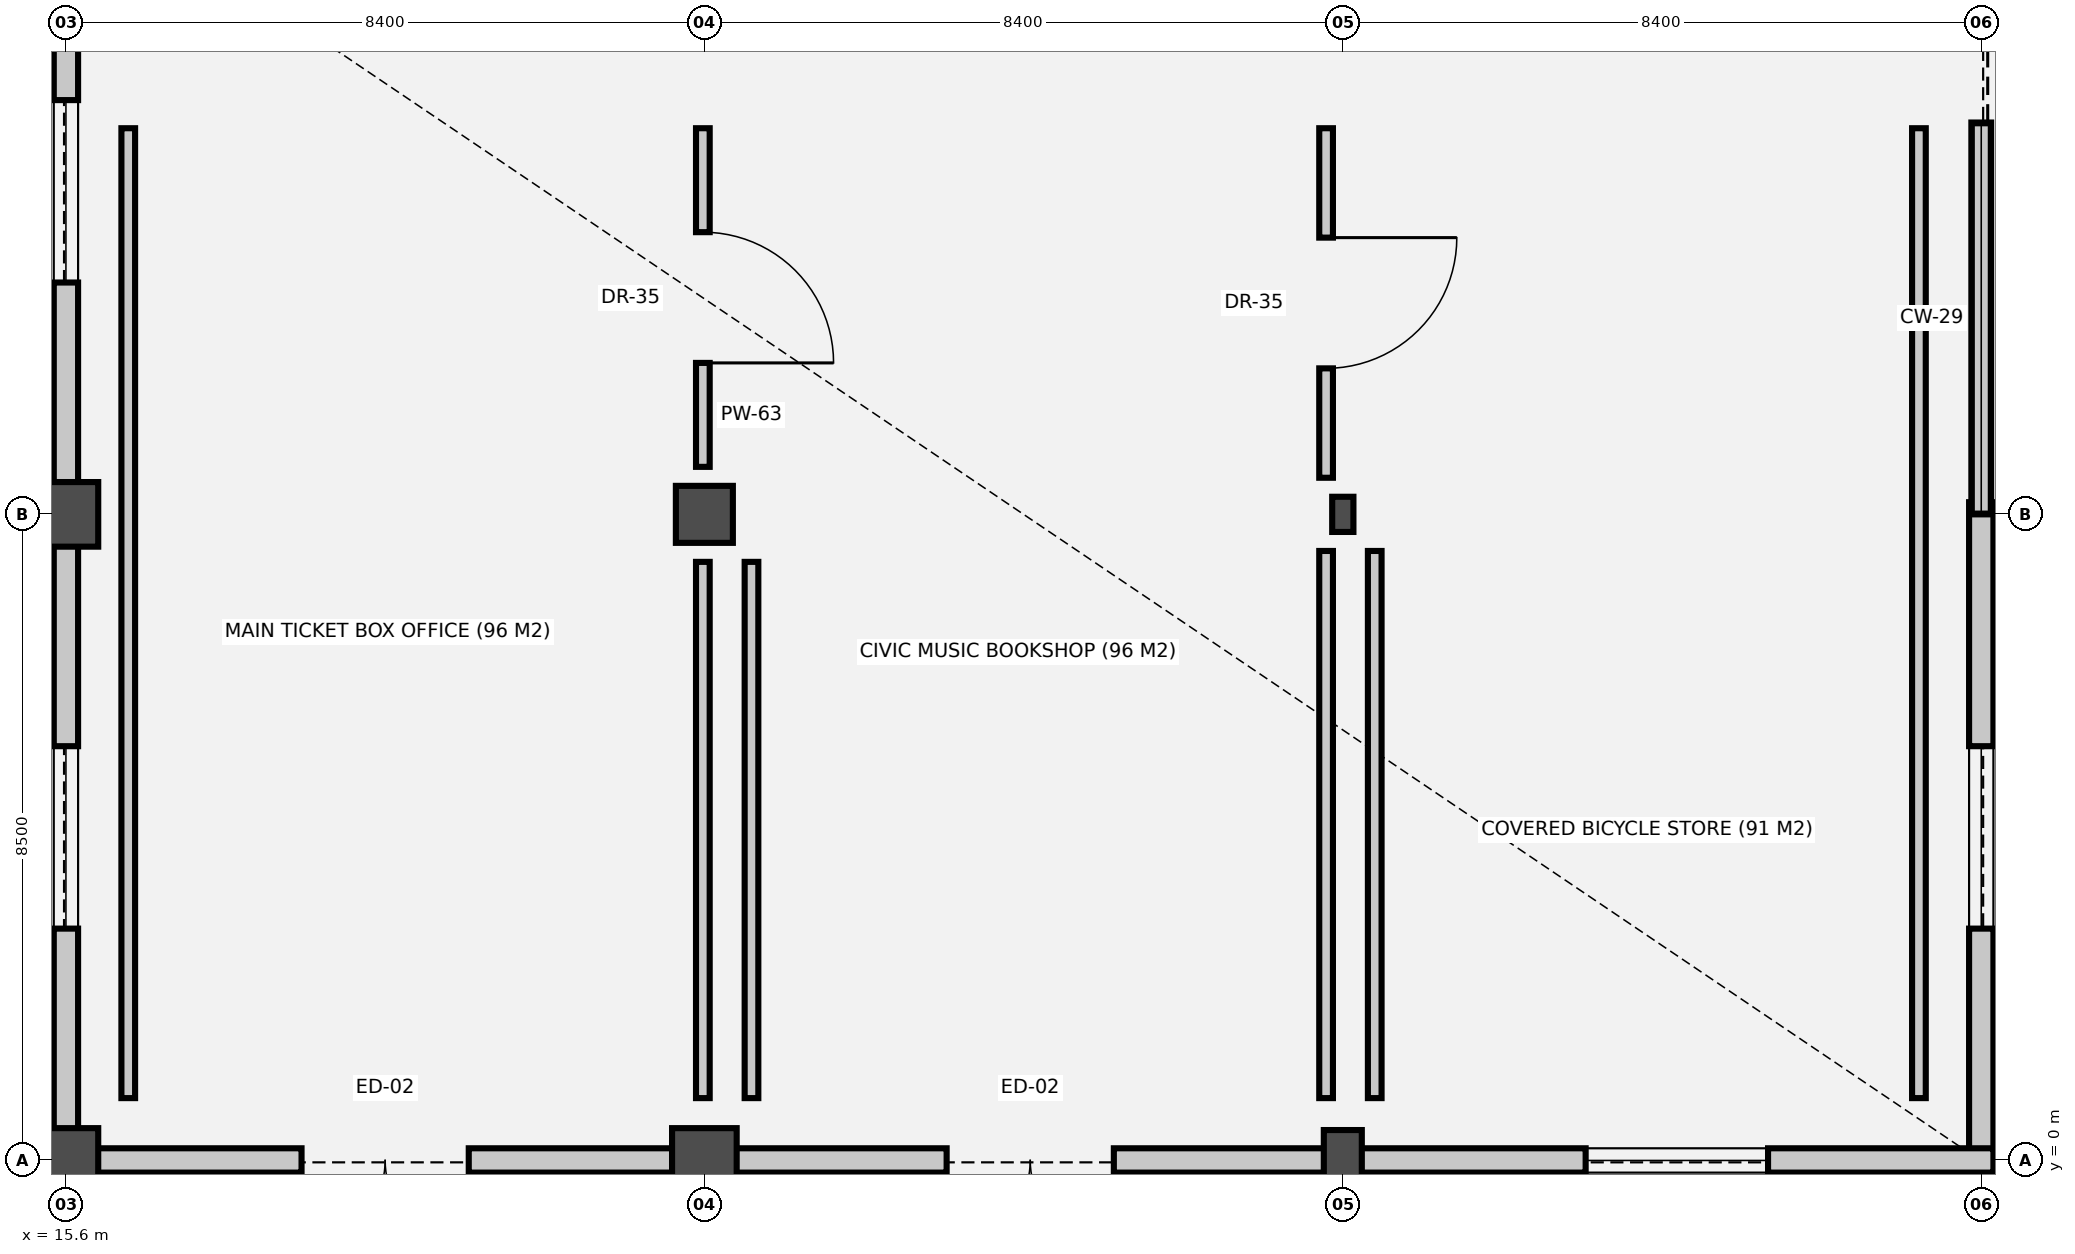
"""IFC4 building model, lengths in metres.
Left out: names, types, materials, properties, quantities, classifications, styles, units other than length and angle.
Written with IfcOpenShell. Run it as: python <this file> out.ifc"""

import sys

from ifc_helpers import new_model, si_unit, direction, frame, frame_2d, origin, origin_2d, place, context, subcontext, project, spatial, rectangle, circle, i_section, extrude, element, fill, save


model = new_model("IFC4")
c1 = context("Model", 3, precision=1e-05, world=origin(), true_north=direction((0.0, 1.0)))
c2 = subcontext(c1, "Body", "Model", "MODEL_VIEW")
j1 = project(units=[si_unit("LENGTHUNIT", "METRE"), si_unit("PLANEANGLEUNIT", "RADIAN")], contexts=[c1])
p1 = place(None, origin())
s1 = spatial("IfcSite", under=j1, at=p1, CompositionType="ELEMENT")
p2 = place(p1, origin())
s2 = spatial("IfcBuilding", under=s1, at=p2, CompositionType="ELEMENT")
p3 = place(p2, origin())
s3 = spatial("IfcBuildingStorey", under=s2, at=p3, CompositionType="ELEMENT", Elevation=0.0)
for number, where, z_axis, x_axis in (
    (1, (15.6, 0.0, 0.0), (0.0, 0.0, 1.0), (1.0, 0.0, 0.0)),
    (2, (15.6, 8.5, 0.0), (0.0, 0.0, 1.0), (1.0, 0.0, 0.0)),
    (3, (24.0, 0.0, 0.0), (0.0, 0.0, 1.0), (1.0, 0.0, 0.0)),
):
    element("IfcColumn", number, at=place(p3, frame(where, z_axis=z_axis, x_axis=x_axis)), inside=s3, PredefinedType="COLUMN", context=c2, shape_type="SweptSolid", body=[
        extrude(circle(Radius=0.425, at=origin_2d()), origin(), (0.0, 0.0, 1.0), 5.4),
    ])
p4 = place(p3, frame((24.0, 8.5, 0.0), z_axis=(0.0, 0.0, 1.0), x_axis=(1.0, 0.0, 0.0)))
e4 = element("IfcColumn", 4, at=p4, inside=s3, PredefinedType="COLUMN", context=c2, shape_type="SweptSolid", body=[
    extrude(rectangle(XDim=0.75, YDim=0.75, at=origin_2d()), origin(), (0.0, 0.0, 1.0), 5.4),
])
p5 = place(p3, frame((32.4, 0.0, 0.0), z_axis=(0.0, 0.0, 1.0), x_axis=(1.0, 0.0, 0.0)))
e5 = element("IfcColumn", 5, at=p5, inside=s3, PredefinedType="PILASTER", context=c2, shape_type="SweptSolid", body=[
    extrude(rectangle(XDim=0.5, YDim=0.8, at=origin_2d()), origin(), (0.0, 0.0, 1.0), 5.4),
])
p6 = place(p3, frame((32.4, 8.5, 0.0), z_axis=(0.0, 0.0, 1.0), x_axis=(1.0, 0.0, 0.0)))
e6 = element("IfcColumn", 6, at=p6, inside=s3, PredefinedType="PILASTER", context=c2, shape_type="SweptSolid", body=[
    extrude(i_section(OverallWidth=0.28, OverallDepth=0.463, WebThickness=0.011, FlangeThickness=0.017, at=origin_2d()), origin(), (0.0, 0.0, 1.0), 5.4),
])
p7 = place(p3, frame((15.6, 0.405, 0.0), z_axis=(0.0, 0.0, 1.0), x_axis=(0.0, 1.0, 0.0)))
e7 = element("IfcWall", 7, at=p7, inside=s3, PredefinedType="SOLIDWALL", context=c2, shape_type="SweptSolid", body=[
    extrude(rectangle(XDim=7.69, YDim=0.32, at=frame_2d((3.845, 0.0))), origin(), (0.0, 0.0, 1.0), 4.516),
])
p8 = place(p7, frame((2.645, 0.0, 0.9)))
e8 = element("IfcOpeningElement", 8, at=p8, cuts=e7, PredefinedType="OPENING", context=c2, shape_type="SweptSolid", body=[
    extrude(rectangle(XDim=2.4, YDim=2.3, at=frame_2d((1.2, 1.15))), frame((0.0, 0.17, 0.0), z_axis=(0.0, -1.0, 0.0), x_axis=(1.0, 0.0, 0.0)), (0.0, 0.0, 1.0), 0.34),
])
p9 = place(p3, frame((15.6, 8.905, 0.0), z_axis=(0.0, 0.0, 1.0), x_axis=(0.0, 1.0, 0.0)))
e9 = element("IfcWall", 9, at=p9, inside=s3, PredefinedType="SOLIDWALL", context=c2, shape_type="SweptSolid", body=[
    extrude(rectangle(XDim=7.69, YDim=0.32, at=frame_2d((3.845, 0.0))), origin(), (0.0, 0.0, 1.0), 4.575),
])
p10 = place(p9, frame((2.645, 0.0, 0.9)))
e10 = element("IfcOpeningElement", 10, at=p10, cuts=e9, PredefinedType="OPENING", context=c2, shape_type="SweptSolid", body=[
    extrude(rectangle(XDim=2.4, YDim=2.3, at=frame_2d((1.2, 1.15))), frame((0.0, 0.17, 0.0), z_axis=(0.0, -1.0, 0.0), x_axis=(1.0, 0.0, 0.0)), (0.0, 0.0, 1.0), 0.34),
])
p11 = place(p3, frame((40.8, 8.66, 0.0), z_axis=(0.0, 0.0, 1.0), x_axis=(0.0, -1.0, 0.0)))
e11 = element("IfcWall", 11, at=p11, inside=s3, PredefinedType="SOLIDWALL", context=c2, shape_type="SweptSolid", body=[
    extrude(rectangle(XDim=8.82, YDim=0.32, at=frame_2d((4.41, 0.0))), origin(), (0.0, 0.0, 1.0), 5.12),
])
p12 = place(p11, frame((3.21, 0.0, 0.9)))
e12 = element("IfcOpeningElement", 12, at=p12, cuts=e11, PredefinedType="OPENING", context=c2, shape_type="SweptSolid", body=[
    extrude(rectangle(XDim=2.4, YDim=2.3, at=frame_2d((1.2, 1.15))), frame((0.0, 0.17, 0.0), z_axis=(0.0, -1.0, 0.0), x_axis=(1.0, 0.0, 0.0)), (0.0, 0.0, 1.0), 0.34),
])
p13 = place(p3, frame((40.8, 13.655, 0.0), z_axis=(0.0, 0.0, 1.0), x_axis=(0.0, -1.0, 0.0)))
e13 = element("IfcWall", 13, at=p13, inside=s3, PredefinedType="PARAPET", context=c2, shape_type="SweptSolid", body=[
    extrude(rectangle(XDim=5.155, YDim=0.26, at=frame_2d((2.578, 0.0))), origin(), (0.0, 0.0, 1.0), 1.12),
])
p14 = place(p3, frame((23.595, 0.0, 0.0), z_axis=(0.0, 0.0, 1.0), x_axis=(-1.0, 0.0, 0.0)))
e14 = element("IfcWall", 14, at=p14, inside=s3, PredefinedType="SOLIDWALL", context=c2, shape_type="SweptSolid", body=[
    extrude(rectangle(XDim=7.59, YDim=0.32, at=frame_2d((3.795, 0.0))), origin(), (0.0, 0.0, 1.0), 4.197),
])
p15 = place(p14, frame((2.695, 0.0, 0.0)))
e15 = element("IfcOpeningElement", 15, at=p15, cuts=e14, PredefinedType="OPENING", context=c2, shape_type="SweptSolid", body=[
    extrude(rectangle(XDim=2.2, YDim=2.4, at=frame_2d((1.1, 1.2))), frame((0.0, 0.17, 0.0), z_axis=(0.0, -1.0, 0.0), x_axis=(1.0, 0.0, 0.0)), (0.0, 0.0, 1.0), 0.34),
])
p16 = place(p3, frame((32.17, 0.0, 0.0), z_axis=(0.0, 0.0, 1.0), x_axis=(-1.0, 0.0, 0.0)))
e16 = element("IfcWall", 16, at=p16, inside=s3, PredefinedType="SOLIDWALL", context=c2, shape_type="SweptSolid", body=[
    extrude(rectangle(XDim=7.765, YDim=0.32, at=frame_2d((3.882, 0.0))), origin(), (0.0, 0.0, 1.0), 4.078),
])
p17 = place(p16, frame((2.782, 0.0, 0.0)))
e17 = element("IfcOpeningElement", 17, at=p17, cuts=e16, PredefinedType="OPENING", context=c2, shape_type="SweptSolid", body=[
    extrude(rectangle(XDim=2.2, YDim=2.4, at=frame_2d((1.1, 1.2))), frame((0.0, 0.17, 0.0), z_axis=(0.0, -1.0, 0.0), x_axis=(1.0, 0.0, 0.0)), (0.0, 0.0, 1.0), 0.34),
])
p18 = place(p3, frame((40.96, 0.0, 0.0), z_axis=(0.0, 0.0, 1.0), x_axis=(-1.0, 0.0, 0.0)))
e18 = element("IfcWall", 18, at=p18, inside=s3, PredefinedType="SOLIDWALL", context=c2, shape_type="SweptSolid", body=[
    extrude(rectangle(XDim=8.33, YDim=0.32, at=frame_2d((4.165, 0.0))), origin(), (0.0, 0.0, 1.0), 5.12),
])
p19 = place(p18, frame((2.965, 0.0, 0.9)))
e19 = element("IfcOpeningElement", 19, at=p19, cuts=e18, PredefinedType="OPENING", context=c2, shape_type="SweptSolid", body=[
    extrude(rectangle(XDim=2.4, YDim=2.3, at=frame_2d((1.2, 1.15))), frame((0.0, 0.17, 0.0), z_axis=(0.0, -1.0, 0.0), x_axis=(1.0, 0.0, 0.0)), (0.0, 0.0, 1.0), 0.34),
])
p20 = place(p3, frame((23.98, 13.58, 0.0), z_axis=(0.0, 0.0, 1.0), x_axis=(0.0, -1.0, 0.0)))
e20 = element("IfcWall", 20, at=p20, inside=s3, PredefinedType="PARTITIONING", context=c2, shape_type="SweptSolid", body=[
    extrude(rectangle(XDim=4.455, YDim=0.18, at=frame_2d((2.228, 0.0))), origin(), (0.0, 0.0, 1.0), 4.04),
])
p21 = place(p20, frame((1.367, 0.0, 0.0)))
e21 = element("IfcOpeningElement", 21, at=p21, cuts=e20, PredefinedType="OPENING", context=c2, shape_type="SweptSolid", body=[
    extrude(rectangle(XDim=1.72, YDim=2.36, at=frame_2d((0.86, 1.18))), frame((0.0, 0.1, 0.0), z_axis=(0.0, -1.0, 0.0), x_axis=(1.0, 0.0, 0.0)), (0.0, 0.0, 1.0), 0.2),
])
p22 = place(p3, frame((23.98, 7.875, 0.0), z_axis=(0.0, 0.0, 1.0), x_axis=(0.0, -1.0, 0.0)))
e22 = element("IfcWall", 22, at=p22, inside=s3, PredefinedType="PARTITIONING", context=c2, shape_type="SweptSolid", body=[
    extrude(rectangle(XDim=7.055, YDim=0.18, at=frame_2d((3.527, 0.0))), origin(), (0.0, 0.0, 1.0), 4.04),
])
p23 = place(p3, frame((16.42, 0.82, 0.0), z_axis=(0.0, 0.0, 1.0), x_axis=(0.0, 1.0, 0.0)))
e23 = element("IfcWall", 23, at=p23, inside=s3, PredefinedType="PARTITIONING", context=c2, shape_type="SweptSolid", body=[
    extrude(rectangle(XDim=12.76, YDim=0.18, at=frame_2d((6.38, 0.0))), origin(), (0.0, 0.0, 1.0), 4.04),
])
p24 = place(p3, frame((32.18, 13.58, 0.0), z_axis=(0.0, 0.0, 1.0), x_axis=(0.0, -1.0, 0.0)))
e24 = element("IfcWall", 24, at=p24, inside=s3, PredefinedType="PARTITIONING", context=c2, shape_type="SweptSolid", body=[
    extrude(rectangle(XDim=4.599, YDim=0.18, at=frame_2d((2.299, 0.0))), origin(), (0.0, 0.0, 1.0), 4.04),
])
p25 = place(p24, frame((1.439, 0.0, 0.0)))
e25 = element("IfcOpeningElement", 25, at=p25, cuts=e24, PredefinedType="OPENING", context=c2, shape_type="SweptSolid", body=[
    extrude(rectangle(XDim=1.72, YDim=2.36, at=frame_2d((0.86, 1.18))), frame((0.0, 0.1, 0.0), z_axis=(0.0, -1.0, 0.0), x_axis=(1.0, 0.0, 0.0)), (0.0, 0.0, 1.0), 0.2),
])
p26 = place(p3, frame((32.18, 8.019, 0.0), z_axis=(0.0, 0.0, 1.0), x_axis=(0.0, -1.0, 0.0)))
e26 = element("IfcWall", 26, at=p26, inside=s3, PredefinedType="PARTITIONING", context=c2, shape_type="SweptSolid", body=[
    extrude(rectangle(XDim=7.198, YDim=0.18, at=frame_2d((3.599, 0.0))), origin(), (0.0, 0.0, 1.0), 4.04),
])
p27 = place(p3, frame((24.62, 0.82, 0.0), z_axis=(0.0, 0.0, 1.0), x_axis=(0.0, 1.0, 0.0)))
e27 = element("IfcWall", 27, at=p27, inside=s3, PredefinedType="PARTITIONING", context=c2, shape_type="SweptSolid", body=[
    extrude(rectangle(XDim=7.055, YDim=0.18, at=frame_2d((3.527, 0.0))), origin(), (0.0, 0.0, 1.0), 4.04),
])
p28 = place(p3, frame((39.98, 13.58, 0.0), z_axis=(0.0, 0.0, 1.0), x_axis=(0.0, -1.0, 0.0)))
e28 = element("IfcWall", 28, at=p28, inside=s3, PredefinedType="PARTITIONING", context=c2, shape_type="SweptSolid", body=[
    extrude(rectangle(XDim=12.76, YDim=0.18, at=frame_2d((6.38, 0.0))), origin(), (0.0, 0.0, 1.0), 4.04),
])
p29 = place(p3, frame((32.82, 0.82, 0.0), z_axis=(0.0, 0.0, 1.0), x_axis=(0.0, 1.0, 0.0)))
e29 = element("IfcWall", 29, at=p29, inside=s3, PredefinedType="PARTITIONING", context=c2, shape_type="SweptSolid", body=[
    extrude(rectangle(XDim=7.198, YDim=0.18, at=frame_2d((3.599, 0.0))), origin(), (0.0, 0.0, 1.0), 4.04),
])
p30 = place(p8, origin())
e30 = element("IfcWindow", 30, at=p30, inside=s3, PartitioningType="SINGLE_PANEL", PredefinedType="WINDOW", context=c2, shape_type="SweptSolid", body=[
    extrude(rectangle(XDim=2.4, YDim=2.3, at=frame_2d((1.2, 1.15))), frame((0.0, 0.03, 0.0), z_axis=(0.0, -1.0, 0.0), x_axis=(1.0, 0.0, 0.0)), (0.0, 0.0, 1.0), 0.06),
])
fill(e8, e30)
p31 = place(p10, origin())
e31 = element("IfcWindow", 31, at=p31, inside=s3, PartitioningType="SINGLE_PANEL", PredefinedType="WINDOW", context=c2, shape_type="SweptSolid", body=[
    extrude(rectangle(XDim=2.4, YDim=2.3, at=frame_2d((1.2, 1.15))), frame((0.0, 0.03, 0.0), z_axis=(0.0, -1.0, 0.0), x_axis=(1.0, 0.0, 0.0)), (0.0, 0.0, 1.0), 0.06),
])
fill(e10, e31)
p32 = place(p12, origin())
e32 = element("IfcWindow", 32, at=p32, inside=s3, PartitioningType="SINGLE_PANEL", PredefinedType="WINDOW", context=c2, shape_type="SweptSolid", body=[
    extrude(rectangle(XDim=2.4, YDim=2.3, at=frame_2d((1.2, 1.15))), frame((0.0, 0.03, 0.0), z_axis=(0.0, -1.0, 0.0), x_axis=(1.0, 0.0, 0.0)), (0.0, 0.0, 1.0), 0.06),
])
fill(e12, e32)
p33 = place(p15, origin())
e33 = element("IfcDoor", 33, at=p33, inside=s3, OperationType="DOUBLE_DOOR_SINGLE_SWING", PredefinedType="DOOR", context=c2, shape_type="SweptSolid", body=[
    extrude(rectangle(XDim=2.2, YDim=2.4, at=frame_2d((1.1, 1.2))), frame((0.0, 0.025, 0.0), z_axis=(0.0, -1.0, 0.0), x_axis=(1.0, 0.0, 0.0)), (0.0, 0.0, 1.0), 0.05),
])
fill(e15, e33)
p34 = place(p17, origin())
e34 = element("IfcDoor", 34, at=p34, inside=s3, OperationType="DOUBLE_DOOR_SINGLE_SWING", PredefinedType="DOOR", context=c2, shape_type="SweptSolid", body=[
    extrude(rectangle(XDim=2.2, YDim=2.4, at=frame_2d((1.1, 1.2))), frame((0.0, 0.025, 0.0), z_axis=(0.0, -1.0, 0.0), x_axis=(1.0, 0.0, 0.0)), (0.0, 0.0, 1.0), 0.05),
])
fill(e17, e34)
p35 = place(p19, origin())
e35 = element("IfcWindow", 35, at=p35, inside=s3, PartitioningType="SINGLE_PANEL", PredefinedType="WINDOW", context=c2, shape_type="SweptSolid", body=[
    extrude(rectangle(XDim=2.4, YDim=2.3, at=frame_2d((1.2, 1.15))), frame((0.0, 0.03, 0.0), z_axis=(0.0, -1.0, 0.0), x_axis=(1.0, 0.0, 0.0)), (0.0, 0.0, 1.0), 0.06),
])
fill(e19, e35)
p36 = place(p21, origin())
e36 = element("IfcDoor", 36, at=p36, inside=s3, OperationType="SINGLE_SWING_RIGHT", PredefinedType="DOOR", context=c2, shape_type="SweptSolid", body=[
    extrude(rectangle(XDim=1.72, YDim=2.36, at=frame_2d((0.86, 1.18))), frame((0.0, 0.025, 0.0), z_axis=(0.0, -1.0, 0.0), x_axis=(1.0, 0.0, 0.0)), (0.0, 0.0, 1.0), 0.05),
])
fill(e21, e36)
p37 = place(p25, origin())
e37 = element("IfcDoor", 37, at=p37, inside=s3, OperationType="SINGLE_SWING_LEFT", PredefinedType="DOOR", context=c2, shape_type="SweptSolid", body=[
    extrude(rectangle(XDim=1.72, YDim=2.36, at=frame_2d((0.86, 1.18))), frame((0.0, 0.025, 0.0), z_axis=(0.0, -1.0, 0.0), x_axis=(1.0, 0.0, 0.0)), (0.0, 0.0, 1.0), 0.05),
])
fill(e25, e37)
save(model, sys.argv[1])
